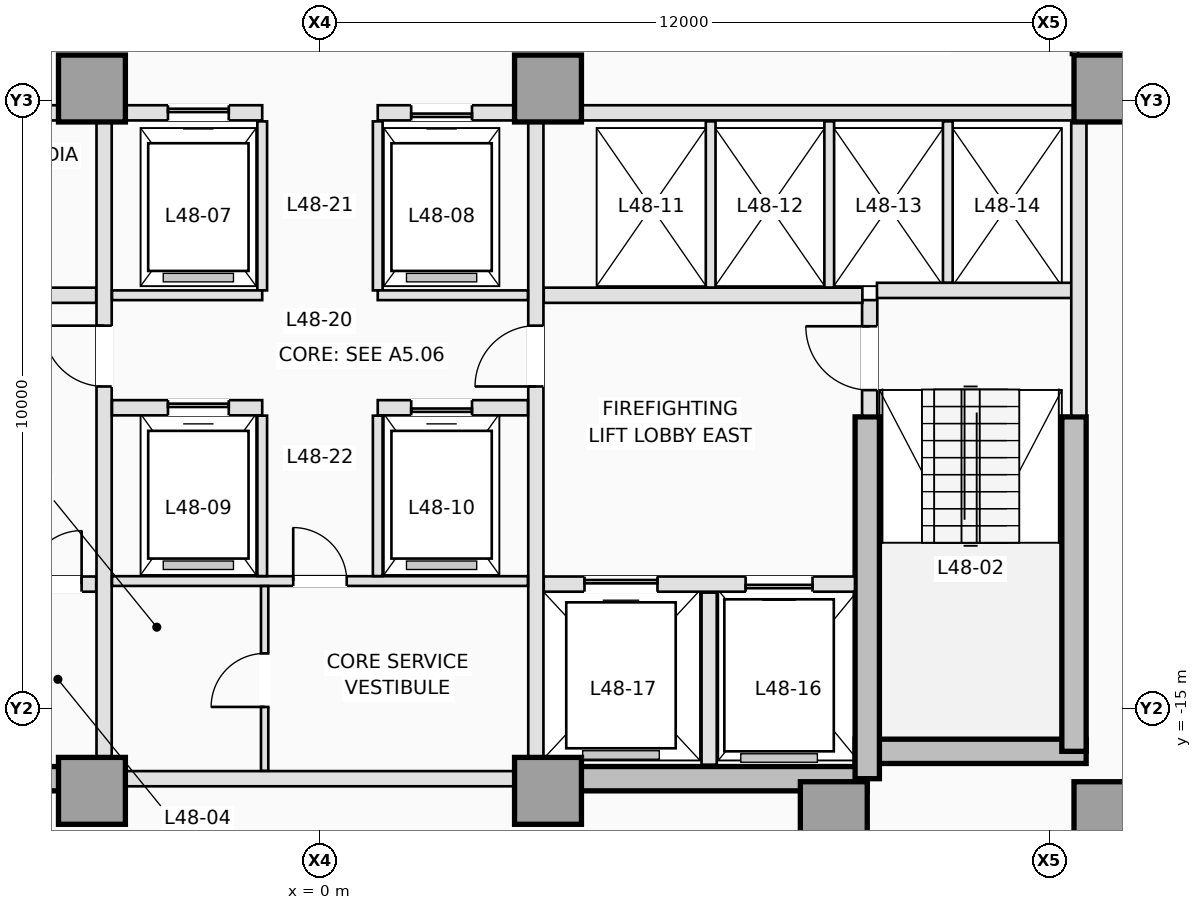
"""IFC4 building model, lengths in metres.
Left out: names, types, materials, properties, quantities, classifications, styles, units other than length and angle.
Written with IfcOpenShell. Run it as: python <this file> out.ifc"""

import sys

from ifc_helpers import new_model, si_unit, direction, frame, frame_2d, origin, origin_2d, place, context, subcontext, project, spatial, rectangle, extrude, element, fill, save


model = new_model("IFC4")
c1 = context("Model", 3, precision=1e-05, world=origin(), true_north=direction((0.0, 1.0)))
c2 = subcontext(c1, "Body", "Model", "MODEL_VIEW")
j1 = project(units=[si_unit("LENGTHUNIT", "METRE"), si_unit("PLANEANGLEUNIT", "RADIAN")], contexts=[c1])
p1 = place(None, origin())
s1 = spatial("IfcSite", under=j1, at=p1, CompositionType="ELEMENT")
p2 = place(p1, origin())
s2 = spatial("IfcBuilding", under=s1, at=p2, CompositionType="ELEMENT")
p3 = place(p2, frame((0.0, 0.0, 175.5)))
s3 = spatial("IfcBuildingStorey", under=s2, at=p3, CompositionType="ELEMENT", Elevation=175.5)
for number, where, z_axis, x_axis in (
    (1, (-9.0, -16.15, 0.0), (0.0, 0.0, 1.0), (1.0, 0.0, 0.0)),
    (2, (3.75, -16.15, 0.0), (0.0, 0.0, 1.0), (1.0, 0.0, 0.0)),
):
    element("IfcWall", number, at=place(p3, frame(where, z_axis=z_axis, x_axis=x_axis)), inside=s3, PredefinedType="SHEAR", context=c2, shape_type="SweptSolid", body=[
        extrude(rectangle(XDim=5.25, YDim=0.4, at=frame_2d((2.625, 0.0))), origin(), (0.0, 0.0, 1.0), 3.5),
    ])
p4 = place(p3, frame((8.8, -15.7, 0.0), z_axis=(0.0, 0.0, 1.0), x_axis=(1.0, 0.0, 0.0)))
e3 = element("IfcWall", 3, at=p4, inside=s3, PredefinedType="SHEAR", context=c2, shape_type="SweptSolid", body=[
    extrude(rectangle(XDim=3.8, YDim=0.4, at=frame_2d((1.9, 0.0))), origin(), (0.0, 0.0, 1.0), 3.5),
])
p5 = place(p3, frame((12.4, -15.7, 0.0), z_axis=(0.0, 0.0, 1.0), x_axis=(0.0, 1.0, 0.0)))
e4 = element("IfcWall", 4, at=p5, inside=s3, PredefinedType="SHEAR", context=c2, shape_type="SweptSolid", body=[
    extrude(rectangle(XDim=5.5, YDim=0.4, at=frame_2d((2.75, 0.0))), origin(), (0.0, 0.0, 1.0), 3.5),
])
p6 = place(p3, frame((9.0, -16.15, 0.0), z_axis=(0.0, 0.0, 1.0), x_axis=(0.0, 1.0, 0.0)))
e5 = element("IfcWall", 5, at=p6, inside=s3, PredefinedType="SHEAR", context=c2, shape_type="SweptSolid", body=[
    extrude(rectangle(XDim=5.95, YDim=0.4, at=frame_2d((2.975, 0.0))), origin(), (0.0, 0.0, 1.0), 3.5),
])
for number, where, z_axis, x_axis in (
    (6, (-3.75, -16.35, 0.0), (0.0, 0.0, 1.0), (1.0, 0.0, 0.0)),
    (7, (3.75, -16.35, 0.0), (0.0, 0.0, 1.0), (1.0, 0.0, 0.0)),
    (8, (8.45, -16.75, 0.0), (0.0, 0.0, 1.0), (1.0, 0.0, 0.0)),
    (9, (12.95, -16.75, 0.0), (0.0, 0.0, 1.0), (1.0, 0.0, 0.0)),
    (10, (-3.75, -4.8, 0.0), (0.0, 0.0, 1.0), (1.0, 0.0, 0.0)),
    (11, (3.75, -4.8, 0.0), (0.0, 0.0, 1.0), (1.0, 0.0, 0.0)),
    (12, (12.95, -4.8, 0.0), (0.0, 0.0, 1.0), (1.0, 0.0, 0.0)),
):
    element("IfcColumn", number, at=place(p3, frame(where, z_axis=z_axis, x_axis=x_axis)), inside=s3, PredefinedType="COLUMN", context=c2, shape_type="SweptSolid", body=[
        extrude(rectangle(XDim=1.1, YDim=1.1, at=origin_2d()), origin(), (0.0, 0.0, 1.0), 3.5),
    ])
p7 = place(p3, frame((9.04, -10.18, 0.0), z_axis=(0.0, 0.0, 1.0), x_axis=(0.0, 1.0, 0.0)))
e13 = element("IfcWall", 13, at=p7, inside=s3, PredefinedType="PARTITIONING", context=c2, shape_type="SweptSolid", body=[
    extrude(rectangle(XDim=1.9, YDim=0.25, at=frame_2d((0.95, 0.0))), origin(), (0.0, 0.0, 1.0), 3.14),
])
p8 = place(p7, frame((0.42, 0.0, 0.0)))
e14 = element("IfcOpeningElement", 14, at=p8, cuts=e13, PredefinedType="OPENING", context=c2, shape_type="SweptSolid", body=[
    extrude(rectangle(XDim=1.05, YDim=2.15, at=frame_2d((0.525, 1.075))), frame((0.0, 0.135, 0.0), z_axis=(0.0, -1.0, 0.0), x_axis=(1.0, 0.0, 0.0)), (0.0, 0.0, 1.0), 0.27),
])
p9 = place(p3, frame((9.16, -8.12, 0.0), z_axis=(0.0, 0.0, 1.0), x_axis=(1.0, 0.0, 0.0)))
e15 = element("IfcWall", 15, at=p9, inside=s3, PredefinedType="PARTITIONING", context=c2, shape_type="SweptSolid", body=[
    extrude(rectangle(XDim=3.22, YDim=0.25, at=frame_2d((1.61, 0.0))), origin(), (0.0, 0.0, 1.0), 3.14),
])
p10 = place(p3, frame((12.48, -10.18, 0.0), z_axis=(0.0, 0.0, 1.0), x_axis=(0.0, 1.0, 0.0)))
e16 = element("IfcWall", 16, at=p10, inside=s3, PredefinedType="PARTITIONING", context=c2, shape_type="SweptSolid", body=[
    extrude(rectangle(XDim=4.828, YDim=0.25, at=frame_2d((2.414, 0.0))), origin(), (0.0, 0.0, 1.0), 3.14),
])
p11 = place(p3, frame((-8.798, -12.95, 0.0), z_axis=(0.0, 0.0, 1.0), x_axis=(1.0, 0.0, 0.0)))
e17 = element("IfcWall", 17, at=p11, inside=s3, PredefinedType="PARTITIONING", context=c2, shape_type="SweptSolid", body=[
    extrude(rectangle(XDim=5.118, YDim=0.25, at=frame_2d((2.559, 0.0))), origin(), (0.0, 0.0, 1.0), 3.14),
])
p12 = place(p11, frame((0.698, 0.0, 0.0)))
e18 = element("IfcOpeningElement", 18, at=p12, cuts=e17, PredefinedType="OPENING", context=c2, shape_type="SweptSolid", body=[
    extrude(rectangle(XDim=1.1, YDim=2.15, at=frame_2d((0.55, 1.075))), frame((0.0, 0.135, 0.0), z_axis=(0.0, -1.0, 0.0), x_axis=(1.0, 0.0, 0.0)), (0.0, 0.0, 1.0), 0.27),
])
p13 = place(p11, frame((2.598, 0.0, 0.0)))
e19 = element("IfcOpeningElement", 19, at=p13, cuts=e17, PredefinedType="OPENING", context=c2, shape_type="SweptSolid", body=[
    extrude(rectangle(XDim=0.88, YDim=2.1, at=frame_2d((0.44, 1.05))), frame((0.0, 0.135, 0.0), z_axis=(0.0, -1.0, 0.0), x_axis=(1.0, 0.0, 0.0)), (0.0, 0.0, 1.0), 0.27),
])
p14 = place(p11, frame((3.998, 0.0, 0.0)))
e20 = element("IfcOpeningElement", 20, at=p14, cuts=e17, PredefinedType="OPENING", context=c2, shape_type="SweptSolid", body=[
    extrude(rectangle(XDim=0.88, YDim=2.1, at=frame_2d((0.44, 1.05))), frame((0.0, 0.135, 0.0), z_axis=(0.0, -1.0, 0.0), x_axis=(1.0, 0.0, 0.0)), (0.0, 0.0, 1.0), 0.27),
])
p15 = place(p3, frame((3.68, -12.95, 0.0), z_axis=(0.0, 0.0, 1.0), x_axis=(1.0, 0.0, 0.0)))
e21 = element("IfcWall", 21, at=p15, inside=s3, PredefinedType="PARTITIONING", context=c2, shape_type="SweptSolid", body=[
    extrude(rectangle(XDim=5.118, YDim=0.25, at=frame_2d((2.559, 0.0))), origin(), (0.0, 0.0, 1.0), 3.14),
])
p16 = place(p15, frame((3.32, 0.0, 0.0)))
e22 = element("IfcOpeningElement", 22, at=p16, cuts=e21, PredefinedType="OPENING", context=c2, shape_type="SweptSolid", body=[
    extrude(rectangle(XDim=1.1, YDim=2.15, at=frame_2d((0.55, 1.075))), frame((0.0, 0.135, 0.0), z_axis=(0.0, -1.0, 0.0), x_axis=(1.0, 0.0, 0.0)), (0.0, 0.0, 1.0), 0.27),
])
p17 = place(p15, frame((0.67, 0.0, 0.0)))
e23 = element("IfcOpeningElement", 23, at=p17, cuts=e21, PredefinedType="OPENING", context=c2, shape_type="SweptSolid", body=[
    extrude(rectangle(XDim=1.2, YDim=2.15, at=frame_2d((0.6, 1.075))), frame((0.0, 0.135, 0.0), z_axis=(0.0, -1.0, 0.0), x_axis=(1.0, 0.0, 0.0)), (0.0, 0.0, 1.0), 0.27),
])
p18 = place(p3, frame((6.4, -15.92, 0.0), z_axis=(0.0, 0.0, 1.0), x_axis=(0.0, 1.0, 0.0)))
e24 = element("IfcWall", 24, at=p18, inside=s3, PredefinedType="PARTITIONING", context=c2, shape_type="SweptSolid", body=[
    extrude(rectangle(XDim=2.83, YDim=0.25, at=frame_2d((1.415, 0.0))), origin(), (0.0, 0.0, 1.0), 3.14),
])
for number, where, z_axis, x_axis in (
    (25, (-8.92, -8.2, 0.0), (0.0, 0.0, 1.0), (1.0, 0.0, 0.0)),
    (26, (3.68, -8.2, 0.0), (0.0, 0.0, 1.0), (1.0, 0.0, 0.0)),
):
    element("IfcWall", number, at=place(p3, frame(where, z_axis=z_axis, x_axis=x_axis)), inside=s3, PredefinedType="PARTITIONING", context=c2, shape_type="SweptSolid", body=[
        extrude(rectangle(XDim=5.24, YDim=0.25, at=frame_2d((2.62, 0.0))), origin(), (0.0, 0.0, 1.0), 3.14),
    ])
p19 = place(p3, frame((-3.55, -15.798, 0.0), z_axis=(0.0, 0.0, 1.0), x_axis=(0.0, 1.0, 0.0)))
e27 = element("IfcWall", 27, at=p19, inside=s3, PredefinedType="PARTITIONING", context=c2, shape_type="SweptSolid", body=[
    extrude(rectangle(XDim=10.446, YDim=0.25, at=frame_2d((5.223, 0.0))), origin(), (0.0, 0.0, 1.0), 3.14),
])
p20 = place(p19, frame((6.098, 0.0, 0.0)))
e28 = element("IfcOpeningElement", 28, at=p20, cuts=e27, PredefinedType="OPENING", context=c2, shape_type="SweptSolid", body=[
    extrude(rectangle(XDim=1.0, YDim=2.15, at=frame_2d((0.5, 1.075))), frame((0.0, 0.135, 0.0), z_axis=(0.0, -1.0, 0.0), x_axis=(1.0, 0.0, 0.0)), (0.0, 0.0, 1.0), 0.27),
])
p21 = place(p3, frame((3.55, -15.798, 0.0), z_axis=(0.0, 0.0, 1.0), x_axis=(0.0, 1.0, 0.0)))
e29 = element("IfcWall", 29, at=p21, inside=s3, PredefinedType="PARTITIONING", context=c2, shape_type="SweptSolid", body=[
    extrude(rectangle(XDim=10.446, YDim=0.25, at=frame_2d((5.223, 0.0))), origin(), (0.0, 0.0, 1.0), 3.14),
])
p22 = place(p21, frame((6.098, 0.0, 0.0)))
e30 = element("IfcOpeningElement", 30, at=p22, cuts=e29, PredefinedType="OPENING", context=c2, shape_type="SweptSolid", body=[
    extrude(rectangle(XDim=1.0, YDim=2.15, at=frame_2d((0.5, 1.075))), frame((0.0, 0.135, 0.0), z_axis=(0.0, -1.0, 0.0), x_axis=(1.0, 0.0, 0.0)), (0.0, 0.0, 1.0), 0.27),
])
p23 = place(p3, frame((-12.398, -5.2, 0.0), z_axis=(0.0, 0.0, 1.0), x_axis=(1.0, 0.0, 0.0)))
e31 = element("IfcWall", 31, at=p23, inside=s3, PredefinedType="PARTITIONING", context=c2, shape_type="SweptSolid", body=[
    extrude(rectangle(XDim=8.096, YDim=0.25, at=frame_2d((4.048, 0.0))), origin(), (0.0, 0.0, 1.0), 3.14),
])
p24 = place(p23, frame((2.968, 0.0, 0.0)))
e32 = element("IfcOpeningElement", 32, at=p24, cuts=e31, PredefinedType="OPENING", context=c2, shape_type="SweptSolid", body=[
    extrude(rectangle(XDim=0.92, YDim=2.12, at=frame_2d((0.46, 1.06))), frame((0.0, 0.135, 0.0), z_axis=(0.0, -1.0, 0.0), x_axis=(1.0, 0.0, 0.0)), (0.0, 0.0, 1.0), 0.27),
])
p25 = place(p23, frame((6.068, 0.0, 0.0)))
e33 = element("IfcOpeningElement", 33, at=p25, cuts=e31, PredefinedType="OPENING", context=c2, shape_type="SweptSolid", body=[
    extrude(rectangle(XDim=0.92, YDim=2.12, at=frame_2d((0.46, 1.06))), frame((0.0, 0.135, 0.0), z_axis=(0.0, -1.0, 0.0), x_axis=(1.0, 0.0, 0.0)), (0.0, 0.0, 1.0), 0.27),
])
p26 = place(p3, frame((4.302, -5.2, 0.0), z_axis=(0.0, 0.0, 1.0), x_axis=(1.0, 0.0, 0.0)))
e34 = element("IfcWall", 34, at=p26, inside=s3, PredefinedType="PARTITIONING", context=c2, shape_type="SweptSolid", body=[
    extrude(rectangle(XDim=8.096, YDim=0.25, at=frame_2d((4.048, 0.0))), origin(), (0.0, 0.0, 1.0), 3.14),
])
p27 = place(p3, frame((-3.198, -5.2, 0.0), z_axis=(0.0, 0.0, 1.0), x_axis=(1.0, 0.0, 0.0)))
e35 = element("IfcWall", 35, at=p27, inside=s3, PredefinedType="PARTITIONING", context=c2, shape_type="SweptSolid", body=[
    extrude(rectangle(XDim=2.248, YDim=0.25, at=frame_2d((1.124, 0.0))), origin(), (0.0, 0.0, 1.0), 3.14),
])
p28 = place(p27, frame((0.698, 0.0, 0.0)))
e36 = element("IfcOpeningElement", 36, at=p28, cuts=e35, PredefinedType="OPENING", context=c2, shape_type="SweptSolid", body=[
    extrude(rectangle(XDim=1.0, YDim=2.15, at=frame_2d((0.5, 1.075))), frame((0.0, 0.135, 0.0), z_axis=(0.0, -1.0, 0.0), x_axis=(1.0, 0.0, 0.0)), (0.0, 0.0, 1.0), 0.27),
])
p29 = place(p3, frame((0.95, -5.2, 0.0), z_axis=(0.0, 0.0, 1.0), x_axis=(1.0, 0.0, 0.0)))
e37 = element("IfcWall", 37, at=p29, inside=s3, PredefinedType="PARTITIONING", context=c2, shape_type="SweptSolid", body=[
    extrude(rectangle(XDim=2.248, YDim=0.25, at=frame_2d((1.124, 0.0))), origin(), (0.0, 0.0, 1.0), 3.14),
])
p30 = place(p29, frame((0.55, 0.0, 0.0)))
e38 = element("IfcOpeningElement", 38, at=p30, cuts=e37, PredefinedType="OPENING", context=c2, shape_type="SweptSolid", body=[
    extrude(rectangle(XDim=1.0, YDim=2.15, at=frame_2d((0.5, 1.075))), frame((0.0, 0.135, 0.0), z_axis=(0.0, -1.0, 0.0), x_axis=(1.0, 0.0, 0.0)), (0.0, 0.0, 1.0), 0.27),
])
for number, where, z_axis, x_axis in (
    (39, (6.425, -8.073, 0.0), (0.0, 0.0, 1.0), (0.0, 1.0, 0.0)),
    (40, (8.375, -8.073, 0.0), (0.0, 0.0, 1.0), (0.0, 1.0, 0.0)),
):
    element("IfcWall", number, at=place(p3, frame(where, z_axis=z_axis, x_axis=x_axis)), inside=s3, PredefinedType="PARTITIONING", context=c2, shape_type="SweptSolid", body=[
        extrude(rectangle(XDim=2.733, YDim=0.16, at=frame_2d((1.366, 0.0))), origin(), (0.0, 0.0, 1.0), 3.14),
    ])
p31 = place(p3, frame((10.325, -7.993, 0.0), z_axis=(0.0, 0.0, 1.0), x_axis=(0.0, 1.0, 0.0)))
e41 = element("IfcWall", 41, at=p31, inside=s3, PredefinedType="PARTITIONING", context=c2, shape_type="SweptSolid", body=[
    extrude(rectangle(XDim=2.653, YDim=0.16, at=frame_2d((1.326, 0.0))), origin(), (0.0, 0.0, 1.0), 3.14),
])
p32 = place(p3, frame((-3.198, -16.15, 0.0), z_axis=(0.0, 0.0, 1.0), x_axis=(1.0, 0.0, 0.0)))
e42 = element("IfcWall", 42, at=p32, inside=s3, PredefinedType="PARTITIONING", context=c2, shape_type="SweptSolid", body=[
    extrude(rectangle(XDim=6.396, YDim=0.25, at=frame_2d((3.198, 0.0))), origin(), (0.0, 0.0, 1.0), 2.34),
])
for number, where, z_axis, x_axis in (
    (43, (-0.95, -8.12, 0.0), (0.0, 0.0, 1.0), (0.0, 1.0, 0.0)),
    (44, (0.95, -8.12, 0.0), (0.0, 0.0, 1.0), (0.0, 1.0, 0.0)),
):
    element("IfcWall", number, at=place(p3, frame(where, z_axis=z_axis, x_axis=x_axis)), inside=s3, PredefinedType="PARTITIONING", context=c2, shape_type="SweptSolid", body=[
        extrude(rectangle(XDim=2.78, YDim=0.16, at=frame_2d((1.39, 0.0))), origin(), (0.0, 0.0, 1.0), 3.14),
    ])
for number, where, z_axis, x_axis in (
    (45, (-3.42, -8.2, 0.0), (0.0, 0.0, 1.0), (1.0, 0.0, 0.0)),
    (46, (0.95, -8.2, 0.0), (0.0, 0.0, 1.0), (1.0, 0.0, 0.0)),
):
    element("IfcWall", number, at=place(p3, frame(where, z_axis=z_axis, x_axis=x_axis)), inside=s3, PredefinedType="PARTITIONING", context=c2, shape_type="SweptSolid", body=[
        extrude(rectangle(XDim=2.47, YDim=0.16, at=frame_2d((1.235, 0.0))), origin(), (0.0, 0.0, 1.0), 3.14),
    ])
p33 = place(p3, frame((-3.42, -10.05, 0.0), z_axis=(0.0, 0.0, 1.0), x_axis=(1.0, 0.0, 0.0)))
e47 = element("IfcWall", 47, at=p33, inside=s3, PredefinedType="PARTITIONING", context=c2, shape_type="SweptSolid", body=[
    extrude(rectangle(XDim=2.47, YDim=0.25, at=frame_2d((1.235, 0.0))), origin(), (0.0, 0.0, 1.0), 3.14),
])
p34 = place(p33, frame((0.92, 0.0, 0.0)))
e48 = element("IfcOpeningElement", 48, at=p34, cuts=e47, PredefinedType="OPENING", context=c2, shape_type="SweptSolid", body=[
    extrude(rectangle(XDim=1.0, YDim=2.15, at=frame_2d((0.5, 1.075))), frame((0.0, 0.135, 0.0), z_axis=(0.0, -1.0, 0.0), x_axis=(1.0, 0.0, 0.0)), (0.0, 0.0, 1.0), 0.27),
])
p35 = place(p3, frame((0.95, -10.05, 0.0), z_axis=(0.0, 0.0, 1.0), x_axis=(1.0, 0.0, 0.0)))
e49 = element("IfcWall", 49, at=p35, inside=s3, PredefinedType="PARTITIONING", context=c2, shape_type="SweptSolid", body=[
    extrude(rectangle(XDim=2.47, YDim=0.25, at=frame_2d((1.235, 0.0))), origin(), (0.0, 0.0, 1.0), 3.14),
])
p36 = place(p35, frame((0.55, 0.0, 0.0)))
e50 = element("IfcOpeningElement", 50, at=p36, cuts=e49, PredefinedType="OPENING", context=c2, shape_type="SweptSolid", body=[
    extrude(rectangle(XDim=1.0, YDim=2.15, at=frame_2d((0.5, 1.075))), frame((0.0, 0.135, 0.0), z_axis=(0.0, -1.0, 0.0), x_axis=(1.0, 0.0, 0.0)), (0.0, 0.0, 1.0), 0.27),
])
p37 = place(p3, frame((-3.42, -12.9, 0.0), z_axis=(0.0, 0.0, 1.0), x_axis=(1.0, 0.0, 0.0)))
e51 = element("IfcWall", 51, at=p37, inside=s3, PredefinedType="PARTITIONING", context=c2, shape_type="SweptSolid", body=[
    extrude(rectangle(XDim=6.84, YDim=0.16, at=frame_2d((3.42, 0.0))), origin(), (0.0, 0.0, 1.0), 3.14),
])
p38 = place(p37, frame((2.98, 0.0, 0.0)))
e52 = element("IfcOpeningElement", 52, at=p38, cuts=e51, PredefinedType="OPENING", context=c2, shape_type="SweptSolid", body=[
    extrude(rectangle(XDim=0.88, YDim=2.12, at=frame_2d((0.44, 1.06))), frame((0.0, 0.09, 0.0), z_axis=(0.0, -1.0, 0.0), x_axis=(1.0, 0.0, 0.0)), (0.0, 0.0, 1.0), 0.18),
])
for number, where, z_axis, x_axis in (
    (53, (-0.95, -12.818, 0.0), (0.0, 0.0, 1.0), (0.0, 1.0, 0.0)),
    (54, (0.95, -12.818, 0.0), (0.0, 0.0, 1.0), (0.0, 1.0, 0.0)),
):
    element("IfcWall", number, at=place(p3, frame(where, z_axis=z_axis, x_axis=x_axis)), inside=s3, PredefinedType="PARTITIONING", context=c2, shape_type="SweptSolid", body=[
        extrude(rectangle(XDim=2.638, YDim=0.16, at=frame_2d((1.319, 0.0))), origin(), (0.0, 0.0, 1.0), 3.14),
    ])
p39 = place(p3, frame((-0.91, -16.02, 0.0), z_axis=(0.0, 0.0, 1.0), x_axis=(0.0, 1.0, 0.0)))
e55 = element("IfcWall", 55, at=p39, inside=s3, PredefinedType="PARTITIONING", context=c2, shape_type="SweptSolid", body=[
    extrude(rectangle(XDim=3.038, YDim=0.12, at=frame_2d((1.519, 0.0))), origin(), (0.0, 0.0, 1.0), 3.14),
])
p40 = place(p39, frame((1.05, 0.0, 0.0)))
e56 = element("IfcOpeningElement", 56, at=p40, cuts=e55, PredefinedType="OPENING", context=c2, shape_type="SweptSolid", body=[
    extrude(rectangle(XDim=0.88, YDim=2.12, at=frame_2d((0.44, 1.06))), frame((0.0, 0.07, 0.0), z_axis=(0.0, -1.0, 0.0), x_axis=(1.0, 0.0, 0.0)), (0.0, 0.0, 1.0), 0.14),
])
p41 = place(p3, frame((12.41, -2.462, 0.0), z_axis=(0.0, 0.0, 1.0), x_axis=(0.0, -1.0, 0.0)))
e57 = element("IfcWall", 57, at=p41, inside=s3, PredefinedType="PARTITIONING", context=c2, shape_type="SweptSolid", body=[
    extrude(rectangle(XDim=1.786, YDim=0.12, at=frame_2d((0.893, 0.0))), origin(), (0.0, 0.0, 1.0), 3.14),
])
p42 = place(p28, origin())
e58 = element("IfcDoor", 58, at=p42, inside=s3, OperationType="SLIDING_TO_LEFT", PredefinedType="DOOR", context=c2, shape_type="SweptSolid", body=[
    extrude(rectangle(XDim=1.0, YDim=2.15, at=frame_2d((0.5, 1.075))), frame((0.0, 0.025, 0.0), z_axis=(0.0, -1.0, 0.0), x_axis=(1.0, 0.0, 0.0)), (0.0, 0.0, 1.0), 0.05),
])
fill(e36, e58)
p43 = place(p30, origin())
e59 = element("IfcDoor", 59, at=p43, inside=s3, OperationType="SLIDING_TO_RIGHT", PredefinedType="DOOR", context=c2, shape_type="SweptSolid", body=[
    extrude(rectangle(XDim=1.0, YDim=2.15, at=frame_2d((0.5, 1.075))), frame((0.0, 0.025, 0.0), z_axis=(0.0, -1.0, 0.0), x_axis=(1.0, 0.0, 0.0)), (0.0, 0.0, 1.0), 0.05),
])
fill(e38, e59)
p44 = place(p16, origin())
e60 = element("IfcDoor", 60, at=p44, inside=s3, OperationType="SLIDING_TO_RIGHT", PredefinedType="DOOR", context=c2, shape_type="SweptSolid", body=[
    extrude(rectangle(XDim=1.1, YDim=2.15, at=frame_2d((0.55, 1.075))), frame((0.0, 0.025, 0.0), z_axis=(0.0, -1.0, 0.0), x_axis=(1.0, 0.0, 0.0)), (0.0, 0.0, 1.0), 0.05),
])
fill(e22, e60)
p45 = place(p17, origin())
e61 = element("IfcDoor", 61, at=p45, inside=s3, OperationType="SLIDING_TO_LEFT", PredefinedType="DOOR", context=c2, shape_type="SweptSolid", body=[
    extrude(rectangle(XDim=1.2, YDim=2.15, at=frame_2d((0.6, 1.075))), frame((0.0, 0.025, 0.0), z_axis=(0.0, -1.0, 0.0), x_axis=(1.0, 0.0, 0.0)), (0.0, 0.0, 1.0), 0.05),
])
fill(e23, e61)
p46 = place(p34, origin())
e62 = element("IfcDoor", 62, at=p46, inside=s3, OperationType="SLIDING_TO_LEFT", PredefinedType="DOOR", context=c2, shape_type="SweptSolid", body=[
    extrude(rectangle(XDim=1.0, YDim=2.15, at=frame_2d((0.5, 1.075))), frame((0.0, 0.025, 0.0), z_axis=(0.0, -1.0, 0.0), x_axis=(1.0, 0.0, 0.0)), (0.0, 0.0, 1.0), 0.05),
])
fill(e48, e62)
p47 = place(p36, origin())
e63 = element("IfcDoor", 63, at=p47, inside=s3, OperationType="SLIDING_TO_RIGHT", PredefinedType="DOOR", context=c2, shape_type="SweptSolid", body=[
    extrude(rectangle(XDim=1.0, YDim=2.15, at=frame_2d((0.5, 1.075))), frame((0.0, 0.025, 0.0), z_axis=(0.0, -1.0, 0.0), x_axis=(1.0, 0.0, 0.0)), (0.0, 0.0, 1.0), 0.05),
])
fill(e50, e63)
p48 = place(p8, origin())
e64 = element("IfcDoor", 64, at=p48, inside=s3, OperationType="SINGLE_SWING_RIGHT", PredefinedType="DOOR", context=c2, shape_type="SweptSolid", body=[
    extrude(rectangle(XDim=1.05, YDim=2.15, at=frame_2d((0.525, 1.075))), frame((0.0, 0.025, 0.0), z_axis=(0.0, -1.0, 0.0), x_axis=(1.0, 0.0, 0.0)), (0.0, 0.0, 1.0), 0.05),
])
fill(e14, e64)
p49 = place(p14, origin())
e65 = element("IfcDoor", 65, at=p49, inside=s3, OperationType="SINGLE_SWING_RIGHT", PredefinedType="TRAPDOOR", context=c2, shape_type="SweptSolid", body=[
    extrude(rectangle(XDim=0.88, YDim=2.1, at=frame_2d((0.44, 1.05))), frame((0.0, 0.025, 0.0), z_axis=(0.0, -1.0, 0.0), x_axis=(1.0, 0.0, 0.0)), (0.0, 0.0, 1.0), 0.05),
])
fill(e20, e65)
p50 = place(p20, origin())
e66 = element("IfcDoor", 66, at=p50, inside=s3, OperationType="SINGLE_SWING_RIGHT", PredefinedType="DOOR", context=c2, shape_type="SweptSolid", body=[
    extrude(rectangle(XDim=1.0, YDim=2.15, at=frame_2d((0.5, 1.075))), frame((0.0, 0.025, 0.0), z_axis=(0.0, -1.0, 0.0), x_axis=(1.0, 0.0, 0.0)), (0.0, 0.0, 1.0), 0.05),
])
fill(e28, e66)
p51 = place(p22, origin())
e67 = element("IfcDoor", 67, at=p51, inside=s3, OperationType="SINGLE_SWING_LEFT", PredefinedType="DOOR", context=c2, shape_type="SweptSolid", body=[
    extrude(rectangle(XDim=1.0, YDim=2.15, at=frame_2d((0.5, 1.075))), frame((0.0, 0.025, 0.0), z_axis=(0.0, -1.0, 0.0), x_axis=(1.0, 0.0, 0.0)), (0.0, 0.0, 1.0), 0.05),
])
fill(e30, e67)
p52 = place(p38, origin())
e68 = element("IfcDoor", 68, at=p52, inside=s3, OperationType="SINGLE_SWING_LEFT", PredefinedType="DOOR", context=c2, shape_type="SweptSolid", body=[
    extrude(rectangle(XDim=0.88, YDim=2.12, at=frame_2d((0.44, 1.06))), frame((0.0, 0.025, 0.0), z_axis=(0.0, -1.0, 0.0), x_axis=(1.0, 0.0, 0.0)), (0.0, 0.0, 1.0), 0.05),
])
fill(e52, e68)
p53 = place(p40, origin())
e69 = element("IfcDoor", 69, at=p53, inside=s3, OperationType="SINGLE_SWING_LEFT", PredefinedType="DOOR", context=c2, shape_type="SweptSolid", body=[
    extrude(rectangle(XDim=0.88, YDim=2.12, at=frame_2d((0.44, 1.06))), frame((0.0, 0.025, 0.0), z_axis=(0.0, -1.0, 0.0), x_axis=(1.0, 0.0, 0.0)), (0.0, 0.0, 1.0), 0.05),
])
fill(e56, e69)
save(model, sys.argv[1])
